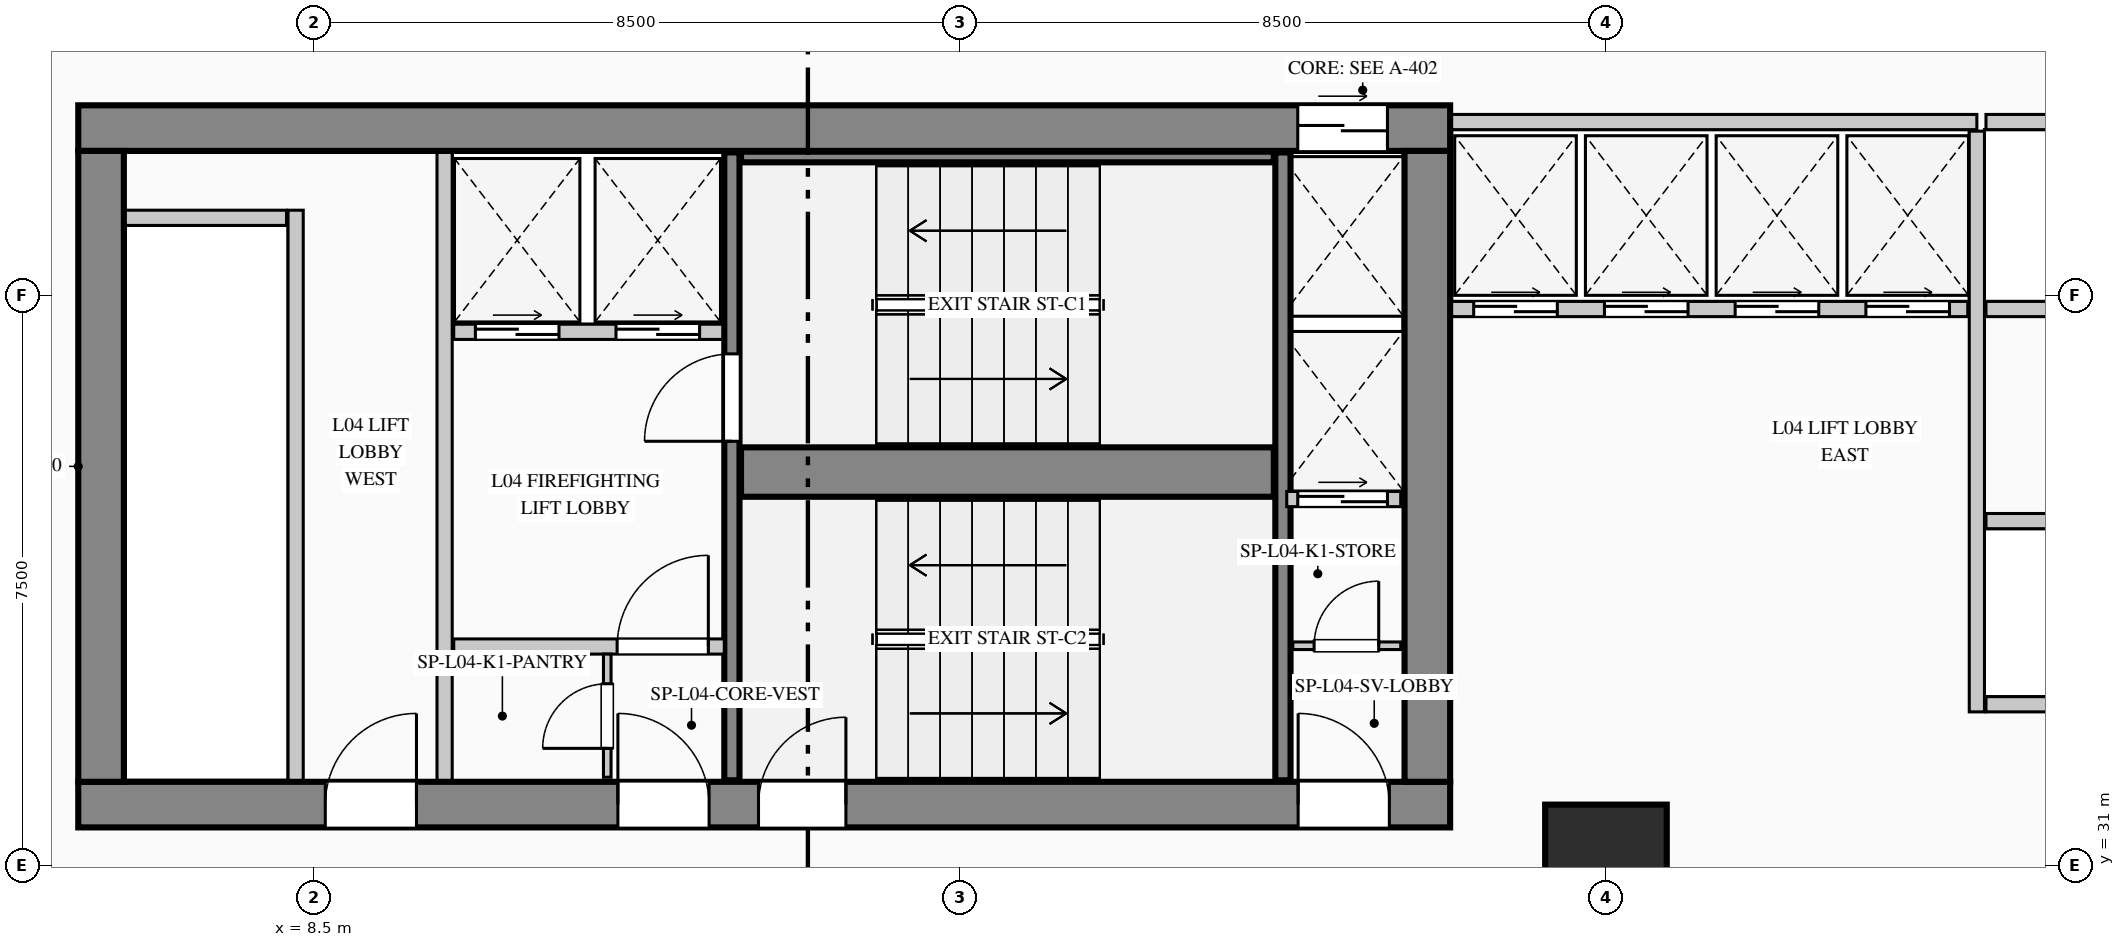
"""IFC4 building model, lengths in metres.
Left out: names, types, materials, properties, quantities, classifications, styles, units other than length and angle.
Written with IfcOpenShell. Run it as: python <this file> out.ifc"""

import sys

from ifc_helpers import new_model, si_unit, direction, frame, frame_2d, origin, origin_2d, place, context, subcontext, project, spatial, rectangle, extrude, element, fill, save


model = new_model("IFC4")
c1 = context("Model", 3, precision=1e-05, world=origin(), true_north=direction((0.0, 1.0)))
c2 = subcontext(c1, "Body", "Model", "MODEL_VIEW")
j1 = project(units=[si_unit("LENGTHUNIT", "METRE"), si_unit("PLANEANGLEUNIT", "RADIAN")], contexts=[c1])
p1 = place(None, origin())
s1 = spatial("IfcSite", under=j1, at=p1, CompositionType="ELEMENT")
p2 = place(p1, origin())
s2 = spatial("IfcBuilding", under=s1, at=p2, CompositionType="ELEMENT")
p3 = place(p2, frame((0.0, 0.0, 16.2)))
s3 = spatial("IfcBuildingStorey", under=s2, at=p3, CompositionType="ELEMENT", Elevation=16.2)
p4 = place(p3, frame((5.4, 40.7, 0.0), z_axis=(0.0, 0.0, 1.0), x_axis=(1.0, 0.0, 0.0)))
e1 = element("IfcWall", 1, at=p4, inside=s3, PredefinedType="SHEAR", context=c2, shape_type="SweptSolid", body=[
    extrude(rectangle(XDim=18.05, YDim=0.6, at=frame_2d((9.025, 0.0))), origin(), (0.0, 0.0, 1.0), 5.4),
])
p5 = place(p4, frame((16.045, 0.0, 0.0)))
e2 = element("IfcOpeningElement", 2, at=p5, cuts=e1, PredefinedType="OPENING", context=c2, shape_type="SweptSolid", body=[
    extrude(rectangle(XDim=1.18, YDim=2.25, at=frame_2d((0.59, 1.125))), frame((0.0, 0.31, 0.0), z_axis=(0.0, -1.0, 0.0), x_axis=(1.0, 0.0, 0.0)), (0.0, 0.0, 1.0), 0.62),
])
p6 = place(p3, frame((5.4, 31.8, 0.0), z_axis=(0.0, 0.0, 1.0), x_axis=(1.0, 0.0, 0.0)))
e3 = element("IfcWall", 3, at=p6, inside=s3, PredefinedType="SHEAR", context=c2, shape_type="SweptSolid", body=[
    extrude(rectangle(XDim=18.05, YDim=0.6, at=frame_2d((9.025, 0.0))), origin(), (0.0, 0.0, 1.0), 5.4),
])
p7 = place(p6, frame((3.25, 0.0, 0.0)))
e4 = element("IfcOpeningElement", 4, at=p7, cuts=e3, PredefinedType="OPENING", context=c2, shape_type="SweptSolid", body=[
    extrude(rectangle(XDim=1.2, YDim=2.2, at=frame_2d((0.6, 1.1))), frame((0.0, 0.31, 0.0), z_axis=(0.0, -1.0, 0.0), x_axis=(1.0, 0.0, 0.0)), (0.0, 0.0, 1.0), 0.62),
])
p8 = place(p6, frame((7.1, 0.0, 0.0)))
e5 = element("IfcOpeningElement", 5, at=p8, cuts=e3, PredefinedType="OPENING", context=c2, shape_type="SweptSolid", body=[
    extrude(rectangle(XDim=1.2, YDim=2.2, at=frame_2d((0.6, 1.1))), frame((0.0, 0.31, 0.0), z_axis=(0.0, -1.0, 0.0), x_axis=(1.0, 0.0, 0.0)), (0.0, 0.0, 1.0), 0.62),
])
p9 = place(p6, frame((8.95, 0.0, 0.0)))
e6 = element("IfcOpeningElement", 6, at=p9, cuts=e3, PredefinedType="OPENING", context=c2, shape_type="SweptSolid", body=[
    extrude(rectangle(XDim=1.15, YDim=2.2, at=frame_2d((0.575, 1.1))), frame((0.0, 0.31, 0.0), z_axis=(0.0, -1.0, 0.0), x_axis=(1.0, 0.0, 0.0)), (0.0, 0.0, 1.0), 0.62),
])
p10 = place(p6, frame((16.05, 0.0, 0.0)))
e7 = element("IfcOpeningElement", 7, at=p10, cuts=e3, PredefinedType="OPENING", context=c2, shape_type="SweptSolid", body=[
    extrude(rectangle(XDim=1.2, YDim=2.2, at=frame_2d((0.6, 1.1))), frame((0.0, 0.31, 0.0), z_axis=(0.0, -1.0, 0.0), x_axis=(1.0, 0.0, 0.0)), (0.0, 0.0, 1.0), 0.62),
])
for number, where, z_axis, x_axis in (
    (8, (5.7, 32.1, 0.0), (0.0, 0.0, 1.0), (0.0, 1.0, 0.0)),
    (9, (23.15, 32.1, 0.0), (0.0, 0.0, 1.0), (0.0, 1.0, 0.0)),
):
    element("IfcWall", number, at=place(p3, frame(where, z_axis=z_axis, x_axis=x_axis)), inside=s3, PredefinedType="SHEAR", context=c2, shape_type="SweptSolid", body=[
        extrude(rectangle(XDim=8.3, YDim=0.6, at=frame_2d((4.15, 0.0))), origin(), (0.0, 0.0, 1.0), 5.4),
    ])
p11 = place(p3, frame((14.0, 32.12, 0.0), z_axis=(0.0, 0.0, 1.0), x_axis=(0.0, 1.0, 0.0)))
e10 = element("IfcWall", 10, at=p11, inside=s3, PredefinedType="SHEAR", context=c2, shape_type="SweptSolid", body=[
    extrude(rectangle(XDim=8.26, YDim=0.2, at=frame_2d((4.13, 0.0))), origin(), (0.0, 0.0, 1.0), 5.4),
])
p12 = place(p11, frame((4.46, 0.0, 0.0)))
e11 = element("IfcOpeningElement", 11, at=p12, cuts=e10, PredefinedType="OPENING", context=c2, shape_type="SweptSolid", body=[
    extrude(rectangle(XDim=1.15, YDim=2.2, at=frame_2d((0.575, 1.1))), frame((0.0, 0.11, 0.0), z_axis=(0.0, -1.0, 0.0), x_axis=(1.0, 0.0, 0.0)), (0.0, 0.0, 1.0), 0.22),
])
p13 = place(p3, frame((14.12, 36.175, 0.0), z_axis=(0.0, 0.0, 1.0), x_axis=(1.0, 0.0, 0.0)))
e12 = element("IfcWall", 12, at=p13, inside=s3, PredefinedType="SHEAR", context=c2, shape_type="SweptSolid", body=[
    extrude(rectangle(XDim=7.01, YDim=0.65, at=frame_2d((3.505, 0.0))), origin(), (0.0, 0.0, 1.0), 5.4),
])
p14 = place(p3, frame((21.25, 32.12, 0.0), z_axis=(0.0, 0.0, 1.0), x_axis=(0.0, 1.0, 0.0)))
e13 = element("IfcWall", 13, at=p14, inside=s3, PredefinedType="SHEAR", context=c2, shape_type="SweptSolid", body=[
    extrude(rectangle(XDim=8.26, YDim=0.2, at=frame_2d((4.13, 0.0))), origin(), (0.0, 0.0, 1.0), 5.4),
])
p15 = place(p3, frame((14.12, 40.32, 0.0), z_axis=(0.0, 0.0, 1.0), x_axis=(1.0, 0.0, 0.0)))
e14 = element("IfcWall", 14, at=p15, inside=s3, PredefinedType="SHEAR", context=c2, shape_type="SweptSolid", body=[
    extrude(rectangle(XDim=7.01, YDim=0.14, at=frame_2d((3.505, 0.0))), origin(), (0.0, 0.0, 1.0), 5.4),
])
p16 = place(p3, frame((25.5, 31.0, 0.0), z_axis=(0.0, 0.0, 1.0), x_axis=(1.0, 0.0, 0.0)))
e15 = element("IfcColumn", 15, at=p16, inside=s3, PredefinedType="COLUMN", context=c2, shape_type="SweptSolid", body=[
    extrude(rectangle(XDim=1.6, YDim=1.6, at=origin_2d()), origin(), (0.0, 0.0, 1.0), 5.4),
])
p17 = place(p3, frame((8.26, 32.12, 0.0), z_axis=(0.0, 0.0, 1.0), x_axis=(0.0, 1.0, 0.0)))
e16 = element("IfcWall", 16, at=p17, inside=s3, PredefinedType="PARTITIONING", context=c2, shape_type="SweptSolid", body=[
    extrude(rectangle(XDim=7.5, YDim=0.2, at=frame_2d((3.75, 0.0))), origin(), (0.0, 0.0, 1.0), 5.0),
])
p18 = place(p3, frame((6.02, 39.52, 0.0), z_axis=(0.0, 0.0, 1.0), x_axis=(1.0, 0.0, 0.0)))
e17 = element("IfcWall", 17, at=p18, inside=s3, PredefinedType="PARTITIONING", context=c2, shape_type="SweptSolid", body=[
    extrude(rectangle(XDim=2.12, YDim=0.2, at=frame_2d((1.06, 0.0))), origin(), (0.0, 0.0, 1.0), 5.0),
])
p19 = place(p3, frame((10.22, 32.12, 0.0), z_axis=(0.0, 0.0, 1.0), x_axis=(0.0, 1.0, 0.0)))
e18 = element("IfcWall", 18, at=p19, inside=s3, PredefinedType="PARTITIONING", context=c2, shape_type="SweptSolid", body=[
    extrude(rectangle(XDim=8.26, YDim=0.2, at=frame_2d((4.13, 0.0))), origin(), (0.0, 0.0, 1.0), 5.0),
])
p20 = place(p3, frame((10.34, 38.02, 0.0), z_axis=(0.0, 0.0, 1.0), x_axis=(1.0, 0.0, 0.0)))
e19 = element("IfcWall", 19, at=p20, inside=s3, PredefinedType="PARTITIONING", context=c2, shape_type="SweptSolid", body=[
    extrude(rectangle(XDim=3.54, YDim=0.2, at=frame_2d((1.77, 0.0))), origin(), (0.0, 0.0, 1.0), 5.0),
])
p21 = place(p20, frame((0.285, 0.0, 0.0)))
e20 = element("IfcOpeningElement", 20, at=p21, cuts=e19, PredefinedType="OPENING", context=c2, shape_type="SweptSolid", body=[
    extrude(rectangle(XDim=1.1, YDim=2.2, at=frame_2d((0.55, 1.1))), frame((0.0, 0.11, 0.0), z_axis=(0.0, -1.0, 0.0), x_axis=(1.0, 0.0, 0.0)), (0.0, 0.0, 1.0), 0.22),
])
p22 = place(p20, frame((2.135, 0.0, 0.0)))
e21 = element("IfcOpeningElement", 21, at=p22, cuts=e19, PredefinedType="OPENING", context=c2, shape_type="SweptSolid", body=[
    extrude(rectangle(XDim=1.1, YDim=2.2, at=frame_2d((0.55, 1.1))), frame((0.0, 0.11, 0.0), z_axis=(0.0, -1.0, 0.0), x_axis=(1.0, 0.0, 0.0)), (0.0, 0.0, 1.0), 0.22),
])
p23 = place(p3, frame((10.34, 33.88, 0.0), z_axis=(0.0, 0.0, 1.0), x_axis=(1.0, 0.0, 0.0)))
e22 = element("IfcWall", 22, at=p23, inside=s3, PredefinedType="PARTITIONING", context=c2, shape_type="SweptSolid", body=[
    extrude(rectangle(XDim=3.56, YDim=0.2, at=frame_2d((1.78, 0.0))), origin(), (0.0, 0.0, 1.0), 5.0),
])
p24 = place(p23, frame((2.15, 0.0, 0.0)))
e23 = element("IfcOpeningElement", 23, at=p24, cuts=e22, PredefinedType="OPENING", context=c2, shape_type="SweptSolid", body=[
    extrude(rectangle(XDim=1.2, YDim=2.2, at=frame_2d((0.6, 1.1))), frame((0.0, 0.11, 0.0), z_axis=(0.0, -1.0, 0.0), x_axis=(1.0, 0.0, 0.0)), (0.0, 0.0, 1.0), 0.22),
])
p25 = place(p3, frame((12.36, 32.16, 0.0), z_axis=(0.0, 0.0, 1.0), x_axis=(0.0, 1.0, 0.0)))
e24 = element("IfcWall", 24, at=p25, inside=s3, PredefinedType="PARTITIONING", context=c2, shape_type="SweptSolid", body=[
    extrude(rectangle(XDim=1.62, YDim=0.1, at=frame_2d((0.81, 0.0))), origin(), (0.0, 0.0, 1.0), 5.0),
])
p26 = place(p25, frame((0.38, 0.0, 0.0)))
e25 = element("IfcOpeningElement", 25, at=p26, cuts=e24, PredefinedType="OPENING", context=c2, shape_type="SweptSolid", body=[
    extrude(rectangle(XDim=0.85, YDim=2.1, at=frame_2d((0.425, 1.05))), frame((0.0, 0.06, 0.0), z_axis=(0.0, -1.0, 0.0), x_axis=(1.0, 0.0, 0.0)), (0.0, 0.0, 1.0), 0.12),
])
p27 = place(p3, frame((21.38, 33.89, 0.0), z_axis=(0.0, 0.0, 1.0), x_axis=(1.0, 0.0, 0.0)))
e26 = element("IfcWall", 26, at=p27, inside=s3, PredefinedType="PARTITIONING", context=c2, shape_type="SweptSolid", body=[
    extrude(rectangle(XDim=1.42, YDim=0.1, at=frame_2d((0.71, 0.0))), origin(), (0.0, 0.0, 1.0), 5.0),
])
p28 = place(p27, frame((0.28, 0.0, 0.0)))
e27 = element("IfcOpeningElement", 27, at=p28, cuts=e26, PredefinedType="OPENING", context=c2, shape_type="SweptSolid", body=[
    extrude(rectangle(XDim=0.85, YDim=2.1, at=frame_2d((0.425, 1.05))), frame((0.0, 0.06, 0.0), z_axis=(0.0, -1.0, 0.0), x_axis=(1.0, 0.0, 0.0)), (0.0, 0.0, 1.0), 0.12),
])
p29 = place(p3, frame((21.3, 35.82, 0.0), z_axis=(0.0, 0.0, 1.0), x_axis=(1.0, 0.0, 0.0)))
e28 = element("IfcWall", 28, at=p29, inside=s3, PredefinedType="PARTITIONING", context=c2, shape_type="SweptSolid", body=[
    extrude(rectangle(XDim=1.5, YDim=0.2, at=frame_2d((0.75, 0.0))), origin(), (0.0, 0.0, 1.0), 5.0),
])
p30 = place(p29, frame((0.145, 0.0, 0.0)))
e29 = element("IfcOpeningElement", 29, at=p30, cuts=e28, PredefinedType="OPENING", context=c2, shape_type="SweptSolid", body=[
    extrude(rectangle(XDim=1.18, YDim=2.25, at=frame_2d((0.59, 1.125))), frame((0.0, 0.11, 0.0), z_axis=(0.0, -1.0, 0.0), x_axis=(1.0, 0.0, 0.0)), (0.0, 0.0, 1.0), 0.22),
])
p31 = place(p3, frame((23.47, 40.78, 0.0), z_axis=(0.0, 0.0, 1.0), x_axis=(1.0, 0.0, 0.0)))
e30 = element("IfcWall", 30, at=p31, inside=s3, PredefinedType="PARTITIONING", context=c2, shape_type="SweptSolid", body=[
    extrude(rectangle(XDim=6.91, YDim=0.2, at=frame_2d((3.455, 0.0))), origin(), (0.0, 0.0, 1.0), 5.0),
])
p32 = place(p3, frame((30.38, 33.02, 0.0), z_axis=(0.0, 0.0, 1.0), x_axis=(0.0, 1.0, 0.0)))
e31 = element("IfcWall", 31, at=p32, inside=s3, PredefinedType="PARTITIONING", context=c2, shape_type="SweptSolid", body=[
    extrude(rectangle(XDim=7.64, YDim=0.2, at=frame_2d((3.82, 0.0))), origin(), (0.0, 0.0, 1.0), 5.0),
])
p33 = place(p3, frame((23.47, 38.32, 0.0), z_axis=(0.0, 0.0, 1.0), x_axis=(1.0, 0.0, 0.0)))
e32 = element("IfcWall", 32, at=p33, inside=s3, PredefinedType="PARTITIONING", context=c2, shape_type="SweptSolid", body=[
    extrude(rectangle(XDim=6.79, YDim=0.2, at=frame_2d((3.395, 0.0))), origin(), (0.0, 0.0, 1.0), 5.0),
])
p34 = place(p33, frame((0.29, 0.0, 0.0)))
e33 = element("IfcOpeningElement", 33, at=p34, cuts=e32, PredefinedType="OPENING", context=c2, shape_type="SweptSolid", body=[
    extrude(rectangle(XDim=1.1, YDim=2.2, at=frame_2d((0.55, 1.1))), frame((0.0, 0.11, 0.0), z_axis=(0.0, -1.0, 0.0), x_axis=(1.0, 0.0, 0.0)), (0.0, 0.0, 1.0), 0.22),
])
p35 = place(p33, frame((2.01, 0.0, 0.0)))
e34 = element("IfcOpeningElement", 34, at=p35, cuts=e32, PredefinedType="OPENING", context=c2, shape_type="SweptSolid", body=[
    extrude(rectangle(XDim=1.1, YDim=2.2, at=frame_2d((0.55, 1.1))), frame((0.0, 0.11, 0.0), z_axis=(0.0, -1.0, 0.0), x_axis=(1.0, 0.0, 0.0)), (0.0, 0.0, 1.0), 0.22),
])
p36 = place(p33, frame((3.73, 0.0, 0.0)))
e35 = element("IfcOpeningElement", 35, at=p36, cuts=e32, PredefinedType="OPENING", context=c2, shape_type="SweptSolid", body=[
    extrude(rectangle(XDim=1.1, YDim=2.2, at=frame_2d((0.55, 1.1))), frame((0.0, 0.11, 0.0), z_axis=(0.0, -1.0, 0.0), x_axis=(1.0, 0.0, 0.0)), (0.0, 0.0, 1.0), 0.22),
])
p37 = place(p33, frame((5.45, 0.0, 0.0)))
e36 = element("IfcOpeningElement", 36, at=p37, cuts=e32, PredefinedType="OPENING", context=c2, shape_type="SweptSolid", body=[
    extrude(rectangle(XDim=1.1, YDim=2.2, at=frame_2d((0.55, 1.1))), frame((0.0, 0.11, 0.0), z_axis=(0.0, -1.0, 0.0), x_axis=(1.0, 0.0, 0.0)), (0.0, 0.0, 1.0), 0.22),
])
p38 = place(p3, frame((30.5, 40.78, 0.0), z_axis=(0.0, 0.0, 1.0), x_axis=(1.0, 0.0, 0.0)))
e37 = element("IfcWall", 37, at=p38, inside=s3, PredefinedType="PARTITIONING", context=c2, shape_type="SweptSolid", body=[
    extrude(rectangle(XDim=6.98, YDim=0.2, at=frame_2d((3.49, 0.0))), origin(), (0.0, 0.0, 1.0), 5.0),
])
p39 = place(p3, frame((30.5, 38.32, 0.0), z_axis=(0.0, 0.0, 1.0), x_axis=(1.0, 0.0, 0.0)))
e38 = element("IfcWall", 38, at=p39, inside=s3, PredefinedType="PARTITIONING", context=c2, shape_type="SweptSolid", body=[
    extrude(rectangle(XDim=6.86, YDim=0.2, at=frame_2d((3.43, 0.0))), origin(), (0.0, 0.0, 1.0), 5.0),
])
for number, where, z_axis, x_axis in (
    (39, (30.5, 35.53, 0.0), (0.0, 0.0, 1.0), (1.0, 0.0, 0.0)),
    (40, (30.5, 33.12, 0.0), (0.0, 0.0, 1.0), (1.0, 0.0, 0.0)),
):
    element("IfcWall", number, at=place(p3, frame(where, z_axis=z_axis, x_axis=x_axis)), inside=s3, PredefinedType="PARTITIONING", context=c2, shape_type="SweptSolid", body=[
        extrude(rectangle(XDim=3.8, YDim=0.2, at=frame_2d((1.9, 0.0))), origin(), (0.0, 0.0, 1.0), 5.0),
    ])
p40 = place(p7, origin())
e41 = element("IfcDoor", 41, at=p40, inside=s3, OperationType="SINGLE_SWING_RIGHT", PredefinedType="DOOR", context=c2, shape_type="SweptSolid", body=[
    extrude(rectangle(XDim=1.2, YDim=2.2, at=frame_2d((0.6, 1.1))), frame((0.0, 0.025, 0.0), z_axis=(0.0, -1.0, 0.0), x_axis=(1.0, 0.0, 0.0)), (0.0, 0.0, 1.0), 0.05),
])
fill(e4, e41)
p41 = place(p8, origin())
e42 = element("IfcDoor", 42, at=p41, inside=s3, OperationType="SINGLE_SWING_LEFT", PredefinedType="DOOR", context=c2, shape_type="SweptSolid", body=[
    extrude(rectangle(XDim=1.2, YDim=2.2, at=frame_2d((0.6, 1.1))), frame((0.0, 0.025, 0.0), z_axis=(0.0, -1.0, 0.0), x_axis=(1.0, 0.0, 0.0)), (0.0, 0.0, 1.0), 0.05),
])
fill(e5, e42)
p42 = place(p9, origin())
e43 = element("IfcDoor", 43, at=p42, inside=s3, OperationType="SINGLE_SWING_RIGHT", PredefinedType="DOOR", context=c2, shape_type="SweptSolid", body=[
    extrude(rectangle(XDim=1.15, YDim=2.2, at=frame_2d((0.575, 1.1))), frame((0.0, 0.025, 0.0), z_axis=(0.0, -1.0, 0.0), x_axis=(1.0, 0.0, 0.0)), (0.0, 0.0, 1.0), 0.05),
])
fill(e6, e43)
p43 = place(p10, origin())
e44 = element("IfcDoor", 44, at=p43, inside=s3, OperationType="SINGLE_SWING_LEFT", PredefinedType="DOOR", context=c2, shape_type="SweptSolid", body=[
    extrude(rectangle(XDim=1.2, YDim=2.2, at=frame_2d((0.6, 1.1))), frame((0.0, 0.025, 0.0), z_axis=(0.0, -1.0, 0.0), x_axis=(1.0, 0.0, 0.0)), (0.0, 0.0, 1.0), 0.05),
])
fill(e7, e44)
p44 = place(p24, origin())
e45 = element("IfcDoor", 45, at=p44, inside=s3, OperationType="SINGLE_SWING_RIGHT", PredefinedType="DOOR", context=c2, shape_type="SweptSolid", body=[
    extrude(rectangle(XDim=1.2, YDim=2.2, at=frame_2d((0.6, 1.1))), frame((0.0, 0.025, 0.0), z_axis=(0.0, -1.0, 0.0), x_axis=(1.0, 0.0, 0.0)), (0.0, 0.0, 1.0), 0.05),
])
fill(e23, e45)
p45 = place(p26, origin())
e46 = element("IfcDoor", 46, at=p45, inside=s3, OperationType="SINGLE_SWING_LEFT", PredefinedType="DOOR", context=c2, shape_type="SweptSolid", body=[
    extrude(rectangle(XDim=0.85, YDim=2.1, at=frame_2d((0.425, 1.05))), frame((0.0, 0.025, 0.0), z_axis=(0.0, -1.0, 0.0), x_axis=(1.0, 0.0, 0.0)), (0.0, 0.0, 1.0), 0.05),
])
fill(e25, e46)
p46 = place(p28, origin())
e47 = element("IfcDoor", 47, at=p46, inside=s3, OperationType="SINGLE_SWING_RIGHT", PredefinedType="DOOR", context=c2, shape_type="SweptSolid", body=[
    extrude(rectangle(XDim=0.85, YDim=2.1, at=frame_2d((0.425, 1.05))), frame((0.0, 0.025, 0.0), z_axis=(0.0, -1.0, 0.0), x_axis=(1.0, 0.0, 0.0)), (0.0, 0.0, 1.0), 0.05),
])
fill(e27, e47)
p47 = place(p12, origin())
e48 = element("IfcDoor", 48, at=p47, inside=s3, OperationType="SINGLE_SWING_LEFT", PredefinedType="DOOR", context=c2, shape_type="SweptSolid", body=[
    extrude(rectangle(XDim=1.15, YDim=2.2, at=frame_2d((0.575, 1.1))), frame((0.0, 0.025, 0.0), z_axis=(0.0, -1.0, 0.0), x_axis=(1.0, 0.0, 0.0)), (0.0, 0.0, 1.0), 0.05),
])
fill(e11, e48)
p48 = place(p21, origin())
e49 = element("IfcDoor", 49, at=p48, inside=s3, OperationType="DOUBLE_DOOR_SLIDING", PredefinedType="DOOR", context=c2, shape_type="SweptSolid", body=[
    extrude(rectangle(XDim=1.1, YDim=2.2, at=frame_2d((0.55, 1.1))), frame((0.0, 0.025, 0.0), z_axis=(0.0, -1.0, 0.0), x_axis=(1.0, 0.0, 0.0)), (0.0, 0.0, 1.0), 0.05),
])
fill(e20, e49)
p49 = place(p22, origin())
e50 = element("IfcDoor", 50, at=p49, inside=s3, OperationType="DOUBLE_DOOR_SLIDING", PredefinedType="DOOR", context=c2, shape_type="SweptSolid", body=[
    extrude(rectangle(XDim=1.1, YDim=2.2, at=frame_2d((0.55, 1.1))), frame((0.0, 0.025, 0.0), z_axis=(0.0, -1.0, 0.0), x_axis=(1.0, 0.0, 0.0)), (0.0, 0.0, 1.0), 0.05),
])
fill(e21, e50)
p50 = place(p5, origin())
e51 = element("IfcDoor", 51, at=p50, inside=s3, OperationType="DOUBLE_DOOR_SLIDING", PredefinedType="DOOR", context=c2, shape_type="SweptSolid", body=[
    extrude(rectangle(XDim=1.18, YDim=2.25, at=frame_2d((0.59, 1.125))), frame((0.0, 0.025, 0.0), z_axis=(0.0, -1.0, 0.0), x_axis=(1.0, 0.0, 0.0)), (0.0, 0.0, 1.0), 0.05),
])
fill(e2, e51)
p51 = place(p30, origin())
e52 = element("IfcDoor", 52, at=p51, inside=s3, OperationType="DOUBLE_DOOR_SLIDING", PredefinedType="DOOR", context=c2, shape_type="SweptSolid", body=[
    extrude(rectangle(XDim=1.18, YDim=2.25, at=frame_2d((0.59, 1.125))), frame((0.0, 0.025, 0.0), z_axis=(0.0, -1.0, 0.0), x_axis=(1.0, 0.0, 0.0)), (0.0, 0.0, 1.0), 0.05),
])
fill(e29, e52)
p52 = place(p34, origin())
e53 = element("IfcDoor", 53, at=p52, inside=s3, OperationType="DOUBLE_DOOR_SLIDING", PredefinedType="DOOR", context=c2, shape_type="SweptSolid", body=[
    extrude(rectangle(XDim=1.1, YDim=2.2, at=frame_2d((0.55, 1.1))), frame((0.0, 0.025, 0.0), z_axis=(0.0, -1.0, 0.0), x_axis=(1.0, 0.0, 0.0)), (0.0, 0.0, 1.0), 0.05),
])
fill(e33, e53)
p53 = place(p35, origin())
e54 = element("IfcDoor", 54, at=p53, inside=s3, OperationType="DOUBLE_DOOR_SLIDING", PredefinedType="DOOR", context=c2, shape_type="SweptSolid", body=[
    extrude(rectangle(XDim=1.1, YDim=2.2, at=frame_2d((0.55, 1.1))), frame((0.0, 0.025, 0.0), z_axis=(0.0, -1.0, 0.0), x_axis=(1.0, 0.0, 0.0)), (0.0, 0.0, 1.0), 0.05),
])
fill(e34, e54)
p54 = place(p36, origin())
e55 = element("IfcDoor", 55, at=p54, inside=s3, OperationType="DOUBLE_DOOR_SLIDING", PredefinedType="DOOR", context=c2, shape_type="SweptSolid", body=[
    extrude(rectangle(XDim=1.1, YDim=2.2, at=frame_2d((0.55, 1.1))), frame((0.0, 0.025, 0.0), z_axis=(0.0, -1.0, 0.0), x_axis=(1.0, 0.0, 0.0)), (0.0, 0.0, 1.0), 0.05),
])
fill(e35, e55)
p55 = place(p37, origin())
e56 = element("IfcDoor", 56, at=p55, inside=s3, OperationType="DOUBLE_DOOR_SLIDING", PredefinedType="DOOR", context=c2, shape_type="SweptSolid", body=[
    extrude(rectangle(XDim=1.1, YDim=2.2, at=frame_2d((0.55, 1.1))), frame((0.0, 0.025, 0.0), z_axis=(0.0, -1.0, 0.0), x_axis=(1.0, 0.0, 0.0)), (0.0, 0.0, 1.0), 0.05),
])
fill(e36, e56)
save(model, sys.argv[1])
